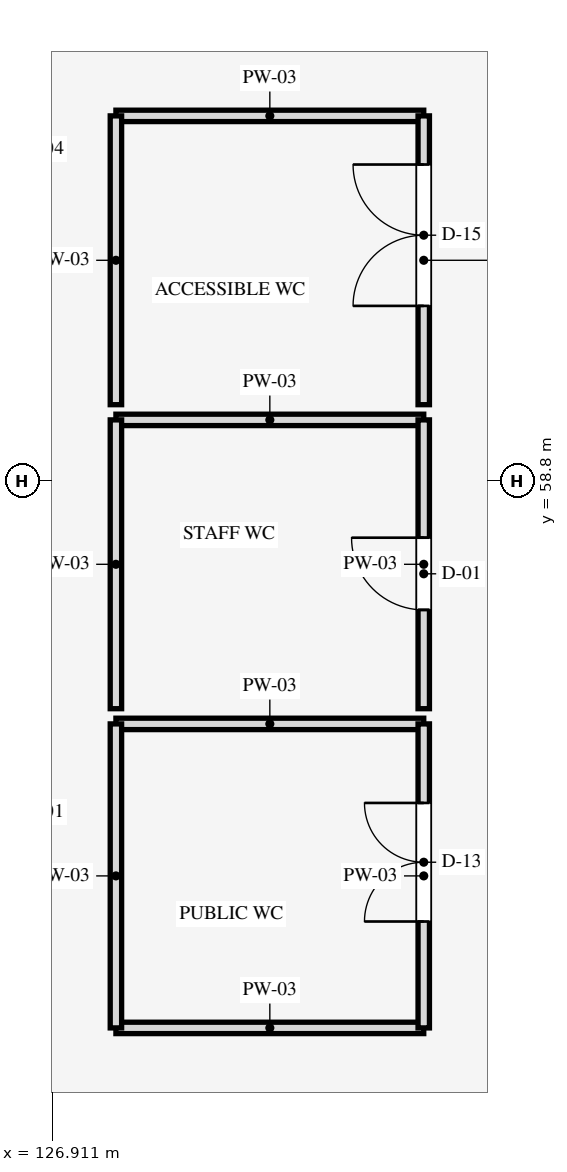
"""IFC4 building model, lengths in metres.
Left out: names, types, materials, properties, quantities, classifications, styles, units other than length and angle.
Written with IfcOpenShell. Run it as: python <this file> out.ifc"""

import sys

from ifc_helpers import new_model, si_unit, direction, frame, frame_2d, origin, place, context, subcontext, project, spatial, rectangle, extrude, element, fill, save


model = new_model("IFC4")
c1 = context("Model", 3, precision=1e-05, world=origin(), true_north=direction((0.0, 1.0)))
c2 = subcontext(c1, "Body", "Model", "MODEL_VIEW")
j1 = project(units=[si_unit("LENGTHUNIT", "METRE"), si_unit("PLANEANGLEUNIT", "RADIAN")], contexts=[c1])
p1 = place(None, origin())
s1 = spatial("IfcSite", under=j1, at=p1, CompositionType="ELEMENT")
p2 = place(p1, origin())
s2 = spatial("IfcBuilding", under=s1, at=p2, CompositionType="ELEMENT")
p3 = place(p2, frame((0.0, 0.0, 40.5)))
s3 = spatial("IfcBuildingStorey", under=s2, at=p3, CompositionType="ELEMENT", Elevation=40.5)
for number, where, z_axis, x_axis in (
    (1, (127.75, 51.6, 0.0), (0.0, 0.0, 1.0), (1.0, 0.0, 0.0)),
    (2, (127.75, 55.6, 0.0), (0.0, 0.0, 1.0), (1.0, 0.0, 0.0)),
):
    element("IfcWall", number, at=place(p3, frame(where, z_axis=z_axis, x_axis=x_axis)), inside=s3, PredefinedType="PARTITIONING", context=c2, shape_type="SweptSolid", body=[
        extrude(rectangle(XDim=4.05, YDim=0.15, at=frame_2d((2.025, 0.0))), origin(), (0.0, 0.0, 1.0), 3.24),
    ])
p4 = place(p3, frame((127.75, 51.6, 0.0), z_axis=(0.0, 0.0, 1.0), x_axis=(0.0, 1.0, 0.0)))
e3 = element("IfcWall", 3, at=p4, inside=s3, PredefinedType="PARTITIONING", context=c2, shape_type="SweptSolid", body=[
    extrude(rectangle(XDim=4.0, YDim=0.15, at=frame_2d((2.0, 0.0))), origin(), (0.0, 0.0, 1.0), 3.24),
])
p5 = place(p3, frame((131.8, 51.6, 0.0), z_axis=(0.0, 0.0, 1.0), x_axis=(0.0, 1.0, 0.0)))
e4 = element("IfcWall", 4, at=p5, inside=s3, PredefinedType="PARTITIONING", context=c2, shape_type="SweptSolid", body=[
    extrude(rectangle(XDim=4.0, YDim=0.15, at=frame_2d((2.0, 0.0))), origin(), (0.0, 0.0, 1.0), 3.24),
])
p6 = place(p5, frame((1.4, 0.0, 0.0)))
e5 = element("IfcOpeningElement", 5, at=p6, cuts=e4, PredefinedType="OPENING", context=c2, shape_type="SweptSolid", body=[
    extrude(rectangle(XDim=1.56, YDim=2.2, at=frame_2d((0.78, 1.1))), frame((0.0, 0.085, 0.0), z_axis=(0.0, -1.0, 0.0), x_axis=(1.0, 0.0, 0.0)), (0.0, 0.0, 1.0), 0.17),
])
p7 = place(p3, frame((127.75, 59.6, 0.0), z_axis=(0.0, 0.0, 1.0), x_axis=(1.0, 0.0, 0.0)))
e6 = element("IfcWall", 6, at=p7, inside=s3, PredefinedType="PARTITIONING", context=c2, shape_type="SweptSolid", body=[
    extrude(rectangle(XDim=4.05, YDim=0.15, at=frame_2d((2.025, 0.0))), origin(), (0.0, 0.0, 1.0), 3.24),
])
p8 = place(p3, frame((127.75, 55.8, 0.0), z_axis=(0.0, 0.0, 1.0), x_axis=(0.0, 1.0, 0.0)))
e7 = element("IfcWall", 7, at=p8, inside=s3, PredefinedType="PARTITIONING", context=c2, shape_type="SweptSolid", body=[
    extrude(rectangle(XDim=3.8, YDim=0.15, at=frame_2d((1.9, 0.0))), origin(), (0.0, 0.0, 1.0), 3.24),
])
p9 = place(p3, frame((131.8, 55.8, 0.0), z_axis=(0.0, 0.0, 1.0), x_axis=(0.0, 1.0, 0.0)))
e8 = element("IfcWall", 8, at=p9, inside=s3, PredefinedType="PARTITIONING", context=c2, shape_type="SweptSolid", body=[
    extrude(rectangle(XDim=3.8, YDim=0.15, at=frame_2d((1.9, 0.0))), origin(), (0.0, 0.0, 1.0), 3.24),
])
p10 = place(p9, frame((1.3, 0.0, 0.0)))
e9 = element("IfcOpeningElement", 9, at=p10, cuts=e8, PredefinedType="OPENING", context=c2, shape_type="SweptSolid", body=[
    extrude(rectangle(XDim=0.95, YDim=2.1, at=frame_2d((0.475, 1.05))), frame((0.0, 0.085, 0.0), z_axis=(0.0, -1.0, 0.0), x_axis=(1.0, 0.0, 0.0)), (0.0, 0.0, 1.0), 0.17),
])
p11 = place(p3, frame((127.75, 63.6, 0.0), z_axis=(0.0, 0.0, 1.0), x_axis=(1.0, 0.0, 0.0)))
e10 = element("IfcWall", 10, at=p11, inside=s3, PredefinedType="PARTITIONING", context=c2, shape_type="SweptSolid", body=[
    extrude(rectangle(XDim=4.05, YDim=0.15, at=frame_2d((2.025, 0.0))), origin(), (0.0, 0.0, 1.0), 3.24),
])
p12 = place(p3, frame((127.75, 59.8, 0.0), z_axis=(0.0, 0.0, 1.0), x_axis=(0.0, 1.0, 0.0)))
e11 = element("IfcWall", 11, at=p12, inside=s3, PredefinedType="PARTITIONING", context=c2, shape_type="SweptSolid", body=[
    extrude(rectangle(XDim=3.8, YDim=0.15, at=frame_2d((1.9, 0.0))), origin(), (0.0, 0.0, 1.0), 3.24),
])
p13 = place(p3, frame((131.8, 59.8, 0.0), z_axis=(0.0, 0.0, 1.0), x_axis=(0.0, 1.0, 0.0)))
e12 = element("IfcWall", 12, at=p13, inside=s3, PredefinedType="PARTITIONING", context=c2, shape_type="SweptSolid", body=[
    extrude(rectangle(XDim=3.8, YDim=0.15, at=frame_2d((1.9, 0.0))), origin(), (0.0, 0.0, 1.0), 3.24),
])
p14 = place(p13, frame((1.3, 0.0, 0.0)))
e13 = element("IfcOpeningElement", 13, at=p14, cuts=e12, PredefinedType="OPENING", context=c2, shape_type="SweptSolid", body=[
    extrude(rectangle(XDim=1.86, YDim=2.26, at=frame_2d((0.93, 1.13))), frame((0.0, 0.085, 0.0), z_axis=(0.0, -1.0, 0.0), x_axis=(1.0, 0.0, 0.0)), (0.0, 0.0, 1.0), 0.17),
])
p15 = place(p6, origin())
e14 = element("IfcDoor", 14, at=p15, inside=s3, OperationType="DOUBLE_DOOR_SINGLE_SWING", PredefinedType="DOOR", context=c2, shape_type="SweptSolid", body=[
    extrude(rectangle(XDim=1.56, YDim=2.2, at=frame_2d((0.78, 1.1))), frame((0.0, 0.025, 0.0), z_axis=(0.0, -1.0, 0.0), x_axis=(1.0, 0.0, 0.0)), (0.0, 0.0, 1.0), 0.05),
])
fill(e5, e14)
p16 = place(p10, origin())
e15 = element("IfcDoor", 15, at=p16, inside=s3, OperationType="SINGLE_SWING_RIGHT", PredefinedType="DOOR", context=c2, shape_type="SweptSolid", body=[
    extrude(rectangle(XDim=0.95, YDim=2.1, at=frame_2d((0.475, 1.05))), frame((0.0, 0.025, 0.0), z_axis=(0.0, -1.0, 0.0), x_axis=(1.0, 0.0, 0.0)), (0.0, 0.0, 1.0), 0.05),
])
fill(e9, e15)
p17 = place(p14, origin())
e16 = element("IfcDoor", 16, at=p17, inside=s3, OperationType="DOUBLE_DOOR_SINGLE_SWING", PredefinedType="DOOR", context=c2, shape_type="SweptSolid", body=[
    extrude(rectangle(XDim=1.86, YDim=2.26, at=frame_2d((0.93, 1.13))), frame((0.0, 0.025, 0.0), z_axis=(0.0, -1.0, 0.0), x_axis=(1.0, 0.0, 0.0)), (0.0, 0.0, 1.0), 0.05),
])
fill(e13, e16)
save(model, sys.argv[1])
